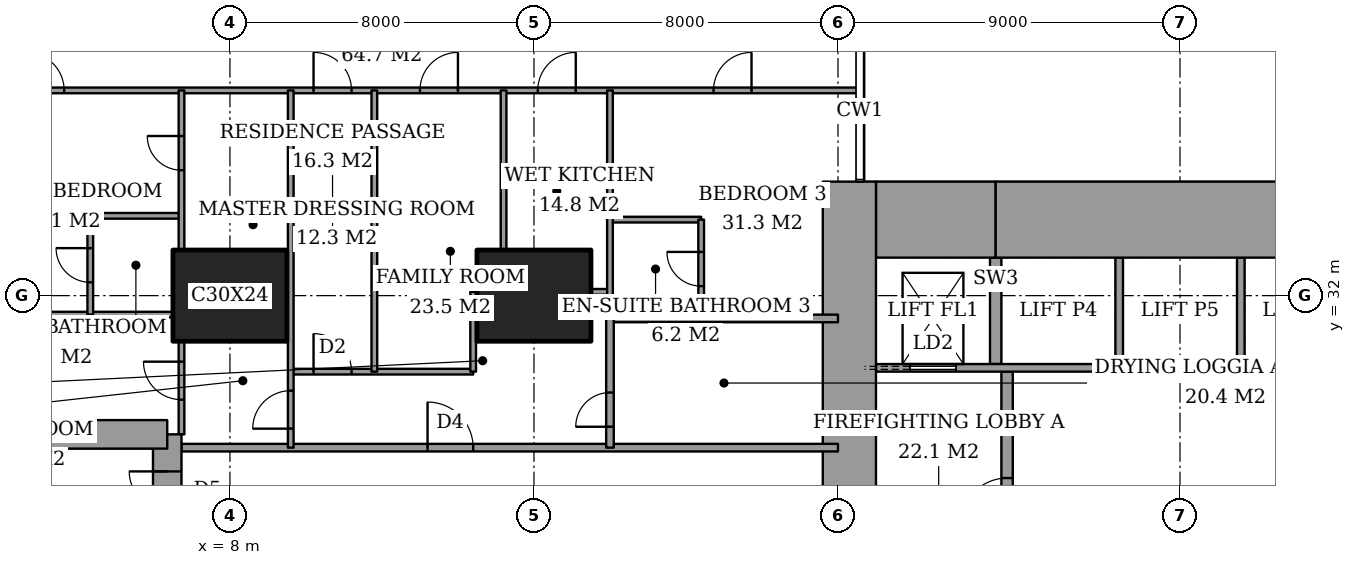
"""IFC4 building model, lengths in metres.
Left out: names, types, materials, properties, quantities, classifications, styles, units other than length and angle.
Written with IfcOpenShell. Run it as: python <this file> out.ifc"""

import sys

from ifc_helpers import new_model, si_unit, direction, frame, frame_2d, origin, origin_2d, place, context, subcontext, project, spatial, rectangle, extrude, element, fill, save


model = new_model("IFC4")
c1 = context("Model", 3, precision=1e-05, world=origin(), true_north=direction((0.0, 1.0)))
c2 = subcontext(c1, "Body", "Model", "MODEL_VIEW")
j1 = project(units=[si_unit("LENGTHUNIT", "METRE"), si_unit("PLANEANGLEUNIT", "RADIAN")], contexts=[c1])
p1 = place(None, origin())
s1 = spatial("IfcSite", under=j1, at=p1, CompositionType="ELEMENT")
p2 = place(p1, origin())
s2 = spatial("IfcBuilding", under=s1, at=p2, CompositionType="ELEMENT")
p3 = place(p2, frame((0.0, 0.0, 65.6)))
s3 = spatial("IfcBuildingStorey", under=s2, at=p3, CompositionType="ELEMENT", Elevation=65.6)
for number, where, z_axis, x_axis in (
    (1, (8.0, 32.0, 0.0), (0.0, 0.0, 1.0), (1.0, 0.0, 0.0)),
    (2, (16.0, 32.0, 0.0), (0.0, 0.0, 1.0), (1.0, 0.0, 0.0)),
):
    element("IfcColumn", number, at=place(p3, frame(where, z_axis=z_axis, x_axis=x_axis)), inside=s3, PredefinedType="COLUMN", context=c2, shape_type="SweptSolid", body=[
        extrude(rectangle(XDim=3.0, YDim=2.4, at=origin_2d()), origin(), (0.0, 0.0, 1.0), 3.6),
    ])
p4 = place(p3, frame((25.0, 34.0, 0.0), z_axis=(0.0, 0.0, 1.0), x_axis=(1.0, 0.0, 0.0)))
e3 = element("IfcWall", 3, at=p4, inside=s3, PredefinedType="SHEAR", context=c2, shape_type="SweptSolid", body=[
    extrude(rectangle(XDim=3.15, YDim=2.0, at=frame_2d((1.575, 0.0))), origin(), (0.0, 0.0, 1.0), 3.6),
])
p5 = place(p3, frame((28.15, 34.0, 0.0), z_axis=(0.0, 0.0, 1.0), x_axis=(1.0, 0.0, 0.0)))
e4 = element("IfcWall", 4, at=p5, inside=s3, PredefinedType="SHEAR", context=c2, shape_type="SweptSolid", body=[
    extrude(rectangle(XDim=9.7, YDim=2.0, at=frame_2d((4.85, 0.0))), origin(), (0.0, 0.0, 1.0), 3.6),
])
p6 = place(p3, frame((24.3, 23.15, 0.0), z_axis=(0.0, 0.0, 1.0), x_axis=(0.0, 1.0, 0.0)))
e5 = element("IfcWall", 5, at=p6, inside=s3, PredefinedType="SHEAR", context=c2, shape_type="SweptSolid", body=[
    extrude(rectangle(XDim=11.85, YDim=1.4, at=frame_2d((5.925, 0.0))), origin(), (0.0, 0.0, 1.0), 3.6),
])
p7 = place(p6, frame((0.75, 0.0, 0.0)))
e6 = element("IfcOpeningElement", 6, at=p7, cuts=e5, PredefinedType="OPENING", context=c2, shape_type="SweptSolid", body=[
    extrude(rectangle(XDim=1.8, YDim=2.4, at=frame_2d((0.9, 1.2))), frame((0.0, 0.71, 0.0), z_axis=(0.0, -1.0, 0.0), x_axis=(1.0, 0.0, 0.0)), (0.0, 0.0, 1.0), 1.42),
])
p8 = place(p3, frame((28.45, 23.3, 0.0), z_axis=(0.0, 0.0, 1.0), x_axis=(0.0, 1.0, 0.0)))
e7 = element("IfcWall", 7, at=p8, inside=s3, PredefinedType="PARTITIONING", context=c2, shape_type="SweptSolid", body=[
    extrude(rectangle(XDim=6.7, YDim=0.3, at=frame_2d((3.35, 0.0))), origin(), (0.0, 0.0, 1.0), 3.6),
])
p9 = place(p8, frame((2.7, 0.0, 0.0)))
e8 = element("IfcOpeningElement", 8, at=p9, cuts=e7, PredefinedType="OPENING", context=c2, shape_type="SweptSolid", body=[
    extrude(rectangle(XDim=1.2, YDim=2.1, at=frame_2d((0.6, 1.05))), frame((0.0, 0.16, 0.0), z_axis=(0.0, -1.0, 0.0), x_axis=(1.0, 0.0, 0.0)), (0.0, 0.0, 1.0), 0.32),
])
p10 = place(p3, frame((6.35, 19.65, 0.0), z_axis=(0.0, 0.0, 1.0), x_axis=(0.0, 1.0, 0.0)))
e9 = element("IfcWall", 9, at=p10, inside=s3, PredefinedType="SHEAR", context=c2, shape_type="SweptSolid", body=[
    extrude(rectangle(XDim=8.7, YDim=0.75, at=frame_2d((4.35, 0.0))), origin(), (0.0, 0.0, 1.0), 3.6),
])
p11 = place(p10, frame((6.725, 0.0, 0.0)))
e10 = element("IfcOpeningElement", 10, at=p11, cuts=e9, PredefinedType="OPENING", context=c2, shape_type="SweptSolid", body=[
    extrude(rectangle(XDim=1.0, YDim=2.1, at=frame_2d((0.5, 1.05))), frame((0.0, 0.385, 0.0), z_axis=(0.0, -1.0, 0.0), x_axis=(1.0, 0.0, 0.0)), (0.0, 0.0, 1.0), 0.77),
])
p12 = place(p3, frame((6.35, 28.35, 0.0), z_axis=(0.0, 0.0, 1.0), x_axis=(-1.0, 0.0, 0.0)))
e11 = element("IfcWall", 11, at=p12, inside=s3, PredefinedType="SHEAR", context=c2, shape_type="SweptSolid", body=[
    extrude(rectangle(XDim=4.45, YDim=0.75, at=frame_2d((2.225, 0.0))), origin(), (0.0, 0.0, 1.0), 3.6),
])
p13 = place(p3, frame((6.725, 28.0, 0.0), z_axis=(0.0, 0.0, 1.0), x_axis=(1.0, 0.0, 0.0)))
e12 = element("IfcWall", 12, at=p13, inside=s3, PredefinedType="PARTITIONING", context=c2, shape_type="SweptSolid", body=[
    extrude(rectangle(XDim=17.275, YDim=0.2, at=frame_2d((8.637, 0.0))), origin(), (0.0, 0.0, 1.0), 3.35),
])
p14 = place(p13, frame((6.475, 0.0, 0.0)))
e13 = element("IfcOpeningElement", 13, at=p14, cuts=e12, PredefinedType="OPENING", context=c2, shape_type="SweptSolid", body=[
    extrude(rectangle(XDim=1.2, YDim=2.4, at=frame_2d((0.6, 1.2))), frame((0.0, 0.11, 0.0), z_axis=(0.0, -1.0, 0.0), x_axis=(1.0, 0.0, 0.0)), (0.0, 0.0, 1.0), 0.22),
])
p15 = place(p3, frame((9.6, 30.0, 0.0), z_axis=(0.0, 0.0, 1.0), x_axis=(1.0, 0.0, 0.0)))
e14 = element("IfcWall", 14, at=p15, inside=s3, PredefinedType="PARTITIONING", context=c2, shape_type="SweptSolid", body=[
    extrude(rectangle(XDim=4.8, YDim=0.15, at=frame_2d((2.4, 0.0))), origin(), (0.0, 0.0, 1.0), 3.35),
])
p16 = place(p15, frame((0.6, 0.0, 0.0)))
e15 = element("IfcOpeningElement", 15, at=p16, cuts=e14, PredefinedType="OPENING", context=c2, shape_type="SweptSolid", body=[
    extrude(rectangle(XDim=1.0, YDim=2.1, at=frame_2d((0.5, 1.05))), frame((0.0, 0.085, 0.0), z_axis=(0.0, -1.0, 0.0), x_axis=(1.0, 0.0, 0.0)), (0.0, 0.0, 1.0), 0.17),
])
p17 = place(p3, frame((18.0, 31.4, 0.0), z_axis=(0.0, 0.0, 1.0), x_axis=(1.0, 0.0, 0.0)))
e16 = element("IfcWall", 16, at=p17, inside=s3, PredefinedType="PARTITIONING", context=c2, shape_type="SweptSolid", body=[
    extrude(rectangle(XDim=6.0, YDim=0.2, at=frame_2d((3.0, 0.0))), origin(), (0.0, 0.0, 1.0), 3.35),
])
p18 = place(p3, frame((1.35, 31.5, 0.0), z_axis=(0.0, 0.0, 1.0), x_axis=(1.0, 0.0, 0.0)))
e17 = element("IfcWall", 17, at=p18, inside=s3, PredefinedType="PARTITIONING", context=c2, shape_type="SweptSolid", body=[
    extrude(rectangle(XDim=5.15, YDim=0.15, at=frame_2d((2.575, 0.0))), origin(), (0.0, 0.0, 1.0), 3.35),
])
p19 = place(p3, frame((17.5, 32.1, 0.0), z_axis=(0.0, 0.0, 1.0), x_axis=(1.0, 0.0, 0.0)))
e18 = element("IfcWall", 18, at=p19, inside=s3, PredefinedType="PARTITIONING", context=c2, shape_type="SweptSolid", body=[
    extrude(rectangle(XDim=0.5, YDim=0.15, at=frame_2d((0.25, 0.0))), origin(), (0.0, 0.0, 1.0), 2.634),
])
p20 = place(p3, frame((18.0, 34.0, 0.0), z_axis=(0.0, 0.0, 1.0), x_axis=(1.0, 0.0, 0.0)))
e19 = element("IfcWall", 19, at=p20, inside=s3, PredefinedType="PARTITIONING", context=c2, shape_type="SweptSolid", body=[
    extrude(rectangle(XDim=2.4, YDim=0.15, at=frame_2d((1.2, 0.0))), origin(), (0.0, 0.0, 1.0), 3.35),
])
p21 = place(p3, frame((4.325, 34.1, 0.0), z_axis=(0.0, 0.0, 1.0), x_axis=(1.0, 0.0, 0.0)))
e20 = element("IfcWall", 20, at=p21, inside=s3, PredefinedType="PARTITIONING", context=c2, shape_type="SweptSolid", body=[
    extrude(rectangle(XDim=2.4, YDim=0.15, at=frame_2d((1.2, 0.0))), origin(), (0.0, 0.0, 1.0), 3.35),
])
p22 = place(p3, frame((-0.45, 37.4, 0.0), z_axis=(0.0, 0.0, 1.0), x_axis=(1.0, 0.0, 0.0)))
e21 = element("IfcWall", 21, at=p22, inside=s3, PredefinedType="PARTITIONING", context=c2, shape_type="SweptSolid", body=[
    extrude(rectangle(XDim=25.011, YDim=0.15, at=frame_2d((12.505, 0.0))), origin(), (0.0, 0.0, 1.0), 3.35),
])
p23 = place(p22, frame((10.65, 0.0, 0.0)))
e22 = element("IfcOpeningElement", 22, at=p23, cuts=e21, PredefinedType="OPENING", context=c2, shape_type="SweptSolid", body=[
    extrude(rectangle(XDim=1.0, YDim=2.1, at=frame_2d((0.5, 1.05))), frame((0.0, 0.085, 0.0), z_axis=(0.0, -1.0, 0.0), x_axis=(1.0, 0.0, 0.0)), (0.0, 0.0, 1.0), 0.17),
])
p24 = place(p22, frame((3.087, 0.0, 0.0)))
e23 = element("IfcOpeningElement", 23, at=p24, cuts=e21, PredefinedType="OPENING", context=c2, shape_type="SweptSolid", body=[
    extrude(rectangle(XDim=1.0, YDim=2.1, at=frame_2d((0.5, 1.05))), frame((0.0, 0.085, 0.0), z_axis=(0.0, -1.0, 0.0), x_axis=(1.0, 0.0, 0.0)), (0.0, 0.0, 1.0), 0.17),
])
p25 = place(p22, frame((13.45, 0.0, 0.0)))
e24 = element("IfcOpeningElement", 24, at=p25, cuts=e21, PredefinedType="OPENING", context=c2, shape_type="SweptSolid", body=[
    extrude(rectangle(XDim=1.0, YDim=2.1, at=frame_2d((0.5, 1.05))), frame((0.0, 0.085, 0.0), z_axis=(0.0, -1.0, 0.0), x_axis=(1.0, 0.0, 0.0)), (0.0, 0.0, 1.0), 0.17),
])
p26 = place(p22, frame((16.55, 0.0, 0.0)))
e25 = element("IfcOpeningElement", 25, at=p26, cuts=e21, PredefinedType="OPENING", context=c2, shape_type="SweptSolid", body=[
    extrude(rectangle(XDim=1.0, YDim=2.1, at=frame_2d((0.5, 1.05))), frame((0.0, 0.085, 0.0), z_axis=(0.0, -1.0, 0.0), x_axis=(1.0, 0.0, 0.0)), (0.0, 0.0, 1.0), 0.17),
])
p27 = place(p22, frame((21.175, 0.0, 0.0)))
e26 = element("IfcOpeningElement", 26, at=p27, cuts=e21, PredefinedType="OPENING", context=c2, shape_type="SweptSolid", body=[
    extrude(rectangle(XDim=1.0, YDim=2.1, at=frame_2d((0.5, 1.05))), frame((0.0, 0.085, 0.0), z_axis=(0.0, -1.0, 0.0), x_axis=(1.0, 0.0, 0.0)), (0.0, 0.0, 1.0), 0.17),
])
p28 = place(p3, frame((4.325, 31.5, 0.0), z_axis=(0.0, 0.0, 1.0), x_axis=(0.0, 1.0, 0.0)))
e27 = element("IfcWall", 27, at=p28, inside=s3, PredefinedType="PARTITIONING", context=c2, shape_type="SweptSolid", body=[
    extrude(rectangle(XDim=2.6, YDim=0.15, at=frame_2d((1.3, 0.0))), origin(), (0.0, 0.0, 1.0), 3.35),
])
p29 = place(p28, frame((0.85, 0.0, 0.0)))
e28 = element("IfcOpeningElement", 28, at=p29, cuts=e27, PredefinedType="OPENING", context=c2, shape_type="SweptSolid", body=[
    extrude(rectangle(XDim=0.9, YDim=2.1, at=frame_2d((0.45, 1.05))), frame((0.0, 0.085, 0.0), z_axis=(0.0, -1.0, 0.0), x_axis=(1.0, 0.0, 0.0)), (0.0, 0.0, 1.0), 0.17),
])
p30 = place(p3, frame((6.725, 28.35, 0.0), z_axis=(0.0, 0.0, 1.0), x_axis=(0.0, 1.0, 0.0)))
e29 = element("IfcWall", 29, at=p30, inside=s3, PredefinedType="PARTITIONING", context=c2, shape_type="SweptSolid", body=[
    extrude(rectangle(XDim=2.45, YDim=0.15, at=frame_2d((1.225, 0.0))), origin(), (0.0, 0.0, 1.0), 3.35),
])
p31 = place(p30, frame((0.913, 0.0, 0.0)))
e30 = element("IfcOpeningElement", 30, at=p31, cuts=e29, PredefinedType="OPENING", context=c2, shape_type="SweptSolid", body=[
    extrude(rectangle(XDim=1.0, YDim=2.1, at=frame_2d((0.5, 1.05))), frame((0.0, 0.085, 0.0), z_axis=(0.0, -1.0, 0.0), x_axis=(1.0, 0.0, 0.0)), (0.0, 0.0, 1.0), 0.17),
])
p32 = place(p3, frame((6.725, 33.2, 0.0), z_axis=(0.0, 0.0, 1.0), x_axis=(0.0, 1.0, 0.0)))
e31 = element("IfcWall", 31, at=p32, inside=s3, PredefinedType="PARTITIONING", context=c2, shape_type="SweptSolid", body=[
    extrude(rectangle(XDim=4.2, YDim=0.15, at=frame_2d((2.1, 0.0))), origin(), (0.0, 0.0, 1.0), 3.35),
])
p33 = place(p32, frame((2.1, 0.0, 0.0)))
e32 = element("IfcOpeningElement", 32, at=p33, cuts=e31, PredefinedType="OPENING", context=c2, shape_type="SweptSolid", body=[
    extrude(rectangle(XDim=0.9, YDim=2.1, at=frame_2d((0.45, 1.05))), frame((0.0, 0.085, 0.0), z_axis=(0.0, -1.0, 0.0), x_axis=(1.0, 0.0, 0.0)), (0.0, 0.0, 1.0), 0.17),
])
p34 = place(p3, frame((9.6, 28.0, 0.0), z_axis=(0.0, 0.0, 1.0), x_axis=(0.0, 1.0, 0.0)))
e33 = element("IfcWall", 33, at=p34, inside=s3, PredefinedType="PARTITIONING", context=c2, shape_type="SweptSolid", body=[
    extrude(rectangle(XDim=9.4, YDim=0.15, at=frame_2d((4.7, 0.0))), origin(), (0.0, 0.0, 1.0), 3.35),
])
p35 = place(p34, frame((0.5, 0.0, 0.0)))
e34 = element("IfcOpeningElement", 34, at=p35, cuts=e33, PredefinedType="OPENING", context=c2, shape_type="SweptSolid", body=[
    extrude(rectangle(XDim=1.0, YDim=2.1, at=frame_2d((0.5, 1.05))), frame((0.0, 0.085, 0.0), z_axis=(0.0, -1.0, 0.0), x_axis=(1.0, 0.0, 0.0)), (0.0, 0.0, 1.0), 0.17),
])
p36 = place(p3, frame((11.8, 30.0, 0.0), z_axis=(0.0, 0.0, 1.0), x_axis=(0.0, 1.0, 0.0)))
e35 = element("IfcWall", 35, at=p36, inside=s3, PredefinedType="PARTITIONING", context=c2, shape_type="SweptSolid", body=[
    extrude(rectangle(XDim=7.4, YDim=0.15, at=frame_2d((3.7, 0.0))), origin(), (0.0, 0.0, 1.0), 3.35),
])
p37 = place(p3, frame((14.4, 30.0, 0.0), z_axis=(0.0, 0.0, 1.0), x_axis=(0.0, 1.0, 0.0)))
e36 = element("IfcWall", 36, at=p37, inside=s3, PredefinedType="PARTITIONING", context=c2, shape_type="SweptSolid", body=[
    extrude(rectangle(XDim=2.1, YDim=0.15, at=frame_2d((1.05, 0.0))), origin(), (0.0, 0.0, 1.0), 3.35),
])
p38 = place(p3, frame((15.2, 33.2, 0.0), z_axis=(0.0, 0.0, 1.0), x_axis=(0.0, 1.0, 0.0)))
e37 = element("IfcWall", 37, at=p38, inside=s3, PredefinedType="PARTITIONING", context=c2, shape_type="SweptSolid", body=[
    extrude(rectangle(XDim=4.2, YDim=0.15, at=frame_2d((2.1, 0.0))), origin(), (0.0, 0.0, 1.0), 3.35),
])
p39 = place(p3, frame((18.0, 28.0, 0.0), z_axis=(0.0, 0.0, 1.0), x_axis=(0.0, 1.0, 0.0)))
e38 = element("IfcWall", 38, at=p39, inside=s3, PredefinedType="PARTITIONING", context=c2, shape_type="SweptSolid", body=[
    extrude(rectangle(XDim=3.4, YDim=0.2, at=frame_2d((1.7, 0.0))), origin(), (0.0, 0.0, 1.0), 3.35),
])
p40 = place(p39, frame((0.55, 0.0, 0.0)))
e39 = element("IfcOpeningElement", 39, at=p40, cuts=e38, PredefinedType="OPENING", context=c2, shape_type="SweptSolid", body=[
    extrude(rectangle(XDim=0.9, YDim=2.1, at=frame_2d((0.45, 1.05))), frame((0.0, 0.11, 0.0), z_axis=(0.0, -1.0, 0.0), x_axis=(1.0, 0.0, 0.0)), (0.0, 0.0, 1.0), 0.22),
])
p41 = place(p3, frame((18.0, 31.4, 0.0), z_axis=(0.0, 0.0, 1.0), x_axis=(0.0, 1.0, 0.0)))
e40 = element("IfcWall", 40, at=p41, inside=s3, PredefinedType="PARTITIONING", context=c2, shape_type="SweptSolid", body=[
    extrude(rectangle(XDim=6.0, YDim=0.15, at=frame_2d((3.0, 0.0))), origin(), (0.0, 0.0, 1.0), 3.35),
])
p42 = place(p3, frame((20.4, 31.4, 0.0), z_axis=(0.0, 0.0, 1.0), x_axis=(0.0, 1.0, 0.0)))
e41 = element("IfcWall", 41, at=p42, inside=s3, PredefinedType="PARTITIONING", context=c2, shape_type="SweptSolid", body=[
    extrude(rectangle(XDim=2.6, YDim=0.15, at=frame_2d((1.3, 0.0))), origin(), (0.0, 0.0, 1.0), 3.35),
])
p43 = place(p42, frame((0.85, 0.0, 0.0)))
e42 = element("IfcOpeningElement", 42, at=p43, cuts=e41, PredefinedType="OPENING", context=c2, shape_type="SweptSolid", body=[
    extrude(rectangle(XDim=0.9, YDim=2.1, at=frame_2d((0.45, 1.05))), frame((0.0, 0.085, 0.0), z_axis=(0.0, -1.0, 0.0), x_axis=(1.0, 0.0, 0.0)), (0.0, 0.0, 1.0), 0.17),
])
p44 = place(p3, frame((25.0, 30.1, 0.0), z_axis=(0.0, 0.0, 1.0), x_axis=(1.0, 0.0, 0.0)))
e43 = element("IfcWall", 43, at=p44, inside=s3, PredefinedType="PARTITIONING", context=c2, shape_type="SweptSolid", body=[
    extrude(rectangle(XDim=12.7, YDim=0.2, at=frame_2d((6.35, 0.0))), origin(), (0.0, 0.0, 1.0), 3.6),
])
p45 = place(p44, frame((0.9, 0.0, 0.0)))
e44 = element("IfcOpeningElement", 44, at=p45, cuts=e43, PredefinedType="OPENING", context=c2, shape_type="SweptSolid", body=[
    extrude(rectangle(XDim=1.2, YDim=2.1, at=frame_2d((0.6, 1.05))), frame((0.0, 0.11, 0.0), z_axis=(0.0, -1.0, 0.0), x_axis=(1.0, 0.0, 0.0)), (0.0, 0.0, 1.0), 0.22),
])
for number, where, z_axis, x_axis in (
    (45, (31.4, 30.2, 0.0), (0.0, 0.0, 1.0), (0.0, 1.0, 0.0)),
    (46, (34.6, 30.2, 0.0), (0.0, 0.0, 1.0), (0.0, 1.0, 0.0)),
):
    element("IfcWall", number, at=place(p3, frame(where, z_axis=z_axis, x_axis=x_axis)), inside=s3, PredefinedType="PARTITIONING", context=c2, shape_type="SweptSolid", body=[
        extrude(rectangle(XDim=2.8, YDim=0.2, at=frame_2d((1.4, 0.0))), origin(), (0.0, 0.0, 1.0), 3.6),
    ])
p46 = place(p3, frame((28.15, 30.2, 0.0), z_axis=(0.0, 0.0, 1.0), x_axis=(0.0, 1.0, 0.0)))
e47 = element("IfcWall", 47, at=p46, inside=s3, PredefinedType="SHEAR", context=c2, shape_type="SweptSolid", body=[
    extrude(rectangle(XDim=2.8, YDim=0.3, at=frame_2d((1.4, 0.0))), origin(), (0.0, 0.0, 1.0), 3.6),
])
p47 = place(p23, origin())
e48 = element("IfcDoor", 48, at=p47, inside=s3, OperationType="SINGLE_SWING_RIGHT", PredefinedType="DOOR", context=c2, shape_type="SweptSolid", body=[
    extrude(rectangle(XDim=1.0, YDim=2.1, at=frame_2d((0.5, 1.05))), frame((0.0, 0.025, 0.0), z_axis=(0.0, -1.0, 0.0), x_axis=(1.0, 0.0, 0.0)), (0.0, 0.0, 1.0), 0.05),
])
fill(e22, e48)
p48 = place(p29, origin())
e49 = element("IfcDoor", 49, at=p48, inside=s3, OperationType="SINGLE_SWING_LEFT", PredefinedType="DOOR", context=c2, shape_type="SweptSolid", body=[
    extrude(rectangle(XDim=0.9, YDim=2.1, at=frame_2d((0.45, 1.05))), frame((0.0, 0.025, 0.0), z_axis=(0.0, -1.0, 0.0), x_axis=(1.0, 0.0, 0.0)), (0.0, 0.0, 1.0), 0.05),
])
fill(e28, e49)
p49 = place(p24, origin())
e50 = element("IfcDoor", 50, at=p49, inside=s3, OperationType="SINGLE_SWING_RIGHT", PredefinedType="DOOR", context=c2, shape_type="SweptSolid", body=[
    extrude(rectangle(XDim=1.0, YDim=2.1, at=frame_2d((0.5, 1.05))), frame((0.0, 0.025, 0.0), z_axis=(0.0, -1.0, 0.0), x_axis=(1.0, 0.0, 0.0)), (0.0, 0.0, 1.0), 0.05),
])
fill(e23, e50)
p50 = place(p31, origin())
e51 = element("IfcDoor", 51, at=p50, inside=s3, OperationType="SINGLE_SWING_LEFT", PredefinedType="DOOR", context=c2, shape_type="SweptSolid", body=[
    extrude(rectangle(XDim=1.0, YDim=2.1, at=frame_2d((0.5, 1.05))), frame((0.0, 0.025, 0.0), z_axis=(0.0, -1.0, 0.0), x_axis=(1.0, 0.0, 0.0)), (0.0, 0.0, 1.0), 0.05),
])
fill(e30, e51)
p51 = place(p33, origin())
e52 = element("IfcDoor", 52, at=p51, inside=s3, OperationType="SINGLE_SWING_LEFT", PredefinedType="DOOR", context=c2, shape_type="SweptSolid", body=[
    extrude(rectangle(XDim=0.9, YDim=2.1, at=frame_2d((0.45, 1.05))), frame((0.0, 0.025, 0.0), z_axis=(0.0, -1.0, 0.0), x_axis=(1.0, 0.0, 0.0)), (0.0, 0.0, 1.0), 0.05),
])
fill(e32, e52)
p52 = place(p35, origin())
e53 = element("IfcDoor", 53, at=p52, inside=s3, OperationType="SINGLE_SWING_RIGHT", PredefinedType="DOOR", context=c2, shape_type="SweptSolid", body=[
    extrude(rectangle(XDim=1.0, YDim=2.1, at=frame_2d((0.5, 1.05))), frame((0.0, 0.025, 0.0), z_axis=(0.0, -1.0, 0.0), x_axis=(1.0, 0.0, 0.0)), (0.0, 0.0, 1.0), 0.05),
])
fill(e34, e53)
p53 = place(p14, origin())
e54 = element("IfcDoor", 54, at=p53, inside=s3, OperationType="SINGLE_SWING_RIGHT", PredefinedType="DOOR", context=c2, shape_type="SweptSolid", body=[
    extrude(rectangle(XDim=1.2, YDim=2.4, at=frame_2d((0.6, 1.2))), frame((0.0, 0.025, 0.0), z_axis=(0.0, -1.0, 0.0), x_axis=(1.0, 0.0, 0.0)), (0.0, 0.0, 1.0), 0.05),
])
fill(e13, e54)
p54 = place(p16, origin())
e55 = element("IfcDoor", 55, at=p54, inside=s3, OperationType="SINGLE_SWING_RIGHT", PredefinedType="DOOR", context=c2, shape_type="SweptSolid", body=[
    extrude(rectangle(XDim=1.0, YDim=2.1, at=frame_2d((0.5, 1.05))), frame((0.0, 0.025, 0.0), z_axis=(0.0, -1.0, 0.0), x_axis=(1.0, 0.0, 0.0)), (0.0, 0.0, 1.0), 0.05),
])
fill(e15, e55)
p55 = place(p25, origin())
e56 = element("IfcDoor", 56, at=p55, inside=s3, OperationType="SINGLE_SWING_LEFT", PredefinedType="DOOR", context=c2, shape_type="SweptSolid", body=[
    extrude(rectangle(XDim=1.0, YDim=2.1, at=frame_2d((0.5, 1.05))), frame((0.0, 0.025, 0.0), z_axis=(0.0, -1.0, 0.0), x_axis=(1.0, 0.0, 0.0)), (0.0, 0.0, 1.0), 0.05),
])
fill(e24, e56)
p56 = place(p26, origin())
e57 = element("IfcDoor", 57, at=p56, inside=s3, OperationType="SINGLE_SWING_LEFT", PredefinedType="DOOR", context=c2, shape_type="SweptSolid", body=[
    extrude(rectangle(XDim=1.0, YDim=2.1, at=frame_2d((0.5, 1.05))), frame((0.0, 0.025, 0.0), z_axis=(0.0, -1.0, 0.0), x_axis=(1.0, 0.0, 0.0)), (0.0, 0.0, 1.0), 0.05),
])
fill(e25, e57)
p57 = place(p43, origin())
e58 = element("IfcDoor", 58, at=p57, inside=s3, OperationType="SINGLE_SWING_LEFT", PredefinedType="DOOR", context=c2, shape_type="SweptSolid", body=[
    extrude(rectangle(XDim=0.9, YDim=2.1, at=frame_2d((0.45, 1.05))), frame((0.0, 0.025, 0.0), z_axis=(0.0, -1.0, 0.0), x_axis=(1.0, 0.0, 0.0)), (0.0, 0.0, 1.0), 0.05),
])
fill(e42, e58)
p58 = place(p27, origin())
e59 = element("IfcDoor", 59, at=p58, inside=s3, OperationType="SINGLE_SWING_LEFT", PredefinedType="DOOR", context=c2, shape_type="SweptSolid", body=[
    extrude(rectangle(XDim=1.0, YDim=2.1, at=frame_2d((0.5, 1.05))), frame((0.0, 0.025, 0.0), z_axis=(0.0, -1.0, 0.0), x_axis=(1.0, 0.0, 0.0)), (0.0, 0.0, 1.0), 0.05),
])
fill(e26, e59)
p59 = place(p40, origin())
e60 = element("IfcDoor", 60, at=p59, inside=s3, OperationType="SINGLE_SWING_RIGHT", PredefinedType="DOOR", context=c2, shape_type="SweptSolid", body=[
    extrude(rectangle(XDim=0.9, YDim=2.1, at=frame_2d((0.45, 1.05))), frame((0.0, 0.025, 0.0), z_axis=(0.0, -1.0, 0.0), x_axis=(1.0, 0.0, 0.0)), (0.0, 0.0, 1.0), 0.05),
])
fill(e39, e60)
p60 = place(p9, origin())
e61 = element("IfcDoor", 61, at=p60, inside=s3, OperationType="SINGLE_SWING_RIGHT", PredefinedType="DOOR", context=c2, shape_type="SweptSolid", body=[
    extrude(rectangle(XDim=1.2, YDim=2.1, at=frame_2d((0.6, 1.05))), frame((0.0, 0.025, 0.0), z_axis=(0.0, -1.0, 0.0), x_axis=(1.0, 0.0, 0.0)), (0.0, 0.0, 1.0), 0.05),
])
fill(e8, e61)
p61 = place(p45, origin())
e62 = element("IfcDoor", 62, at=p61, inside=s3, OperationType="SLIDING_TO_LEFT", PredefinedType="DOOR", context=c2, shape_type="SweptSolid", body=[
    extrude(rectangle(XDim=1.2, YDim=2.1, at=frame_2d((0.6, 1.05))), frame((0.0, 0.025, 0.0), z_axis=(0.0, -1.0, 0.0), x_axis=(1.0, 0.0, 0.0)), (0.0, 0.0, 1.0), 0.05),
])
fill(e44, e62)
p62 = place(p11, origin())
e63 = element("IfcDoor", 63, at=p62, inside=s3, OperationType="SINGLE_SWING_LEFT", PredefinedType="DOOR", context=c2, shape_type="SweptSolid", body=[
    extrude(rectangle(XDim=1.0, YDim=2.1, at=frame_2d((0.5, 1.05))), frame((0.0, 0.025, 0.0), z_axis=(0.0, -1.0, 0.0), x_axis=(1.0, 0.0, 0.0)), (0.0, 0.0, 1.0), 0.05),
])
fill(e10, e63)
save(model, sys.argv[1])
